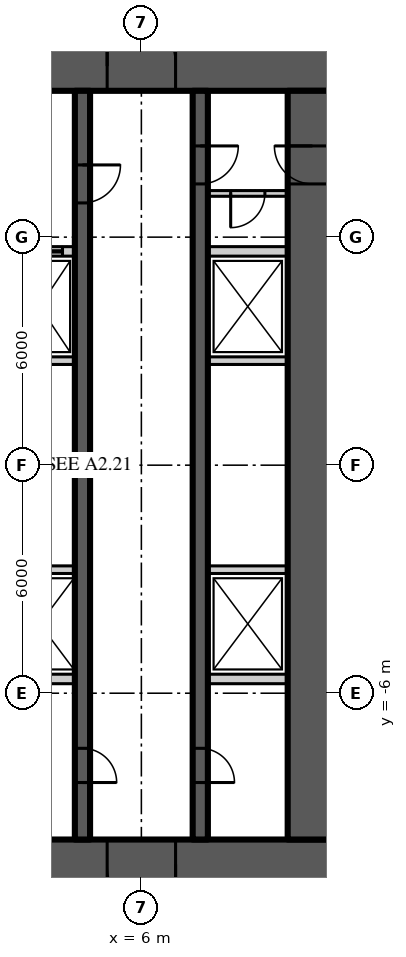
"""IFC4 building model, lengths in metres.
Left out: names, types, materials, properties, quantities, classifications, styles, units other than length and angle.
Written with IfcOpenShell. Run it as: python <this file> out.ifc"""

import sys

from ifc_helpers import new_model, si_unit, direction, frame, frame_2d, origin, place, context, subcontext, project, spatial, rectangle, extrude, element, fill, save


model = new_model("IFC4")
c1 = context("Model", 3, precision=1e-05, world=origin(), true_north=direction((0.0, 1.0)))
c2 = subcontext(c1, "Body", "Model", "MODEL_VIEW")
j1 = project(units=[si_unit("LENGTHUNIT", "METRE"), si_unit("PLANEANGLEUNIT", "RADIAN")], contexts=[c1])
p1 = place(None, origin())
s1 = spatial("IfcSite", under=j1, at=p1, CompositionType="ELEMENT")
p2 = place(p1, origin())
s2 = spatial("IfcBuilding", under=s1, at=p2, CompositionType="ELEMENT")
p3 = place(p2, frame((0.0, 0.0, 151.5)))
s3 = spatial("IfcBuildingStorey", under=s2, at=p3, CompositionType="ELEMENT", Elevation=151.5)
p4 = place(p3, frame((-11.15, 10.5, 0.0), z_axis=(0.0, 0.0, 1.0), x_axis=(1.0, 0.0, 0.0)))
e1 = element("IfcWall", 1, at=p4, inside=s3, PredefinedType="SHEAR", context=c2, shape_type="SweptSolid", body=[
    extrude(rectangle(XDim=22.3, YDim=1.3, at=frame_2d((11.15, 0.0))), origin(), (0.0, 0.0, 1.0), 3.9),
])
p5 = place(p4, frame((4.25, 0.0, 0.0)))
e2 = element("IfcOpeningElement", 2, at=p5, cuts=e1, PredefinedType="OPENING", context=c2, shape_type="SweptSolid", body=[
    extrude(rectangle(XDim=1.8, YDim=2.2, at=frame_2d((0.9, 1.1))), frame((0.0, 0.66, 0.0), z_axis=(0.0, -1.0, 0.0), x_axis=(1.0, 0.0, 0.0)), (0.0, 0.0, 1.0), 1.32),
])
p6 = place(p4, frame((16.25, 0.0, 0.0)))
e3 = element("IfcOpeningElement", 3, at=p6, cuts=e1, PredefinedType="OPENING", context=c2, shape_type="SweptSolid", body=[
    extrude(rectangle(XDim=1.8, YDim=2.2, at=frame_2d((0.9, 1.1))), frame((0.0, 0.66, 0.0), z_axis=(0.0, -1.0, 0.0), x_axis=(1.0, 0.0, 0.0)), (0.0, 0.0, 1.0), 1.32),
])
p7 = place(p3, frame((11.15, -10.5, 0.0), z_axis=(0.0, 0.0, 1.0), x_axis=(-1.0, 0.0, 0.0)))
e4 = element("IfcWall", 4, at=p7, inside=s3, PredefinedType="SHEAR", context=c2, shape_type="SweptSolid", body=[
    extrude(rectangle(XDim=22.3, YDim=1.3, at=frame_2d((11.15, 0.0))), origin(), (0.0, 0.0, 1.0), 3.9),
])
p8 = place(p7, frame((16.25, 0.0, 0.0)))
e5 = element("IfcOpeningElement", 5, at=p8, cuts=e4, PredefinedType="OPENING", context=c2, shape_type="SweptSolid", body=[
    extrude(rectangle(XDim=1.8, YDim=2.2, at=frame_2d((0.9, 1.1))), frame((0.0, 0.66, 0.0), z_axis=(0.0, -1.0, 0.0), x_axis=(1.0, 0.0, 0.0)), (0.0, 0.0, 1.0), 1.32),
])
p9 = place(p7, frame((4.25, 0.0, 0.0)))
e6 = element("IfcOpeningElement", 6, at=p9, cuts=e4, PredefinedType="OPENING", context=c2, shape_type="SweptSolid", body=[
    extrude(rectangle(XDim=1.8, YDim=2.2, at=frame_2d((0.9, 1.1))), frame((0.0, 0.66, 0.0), z_axis=(0.0, -1.0, 0.0), x_axis=(1.0, 0.0, 0.0)), (0.0, 0.0, 1.0), 1.32),
])
p10 = place(p3, frame((10.5, -9.85, 0.0), z_axis=(0.0, 0.0, 1.0), x_axis=(0.0, 1.0, 0.0)))
e7 = element("IfcWall", 7, at=p10, inside=s3, PredefinedType="SHEAR", context=c2, shape_type="SweptSolid", body=[
    extrude(rectangle(XDim=19.7, YDim=1.3, at=frame_2d((9.85, 0.0))), origin(), (0.0, 0.0, 1.0), 3.9),
])
p11 = place(p10, frame((17.25, 0.0, 0.0)))
e8 = element("IfcOpeningElement", 8, at=p11, cuts=e7, PredefinedType="OPENING", context=c2, shape_type="SweptSolid", body=[
    extrude(rectangle(XDim=1.0, YDim=2.2, at=frame_2d((0.5, 1.1))), frame((0.0, 0.66, 0.0), z_axis=(0.0, -1.0, 0.0), x_axis=(1.0, 0.0, 0.0)), (0.0, 0.0, 1.0), 1.32),
])
p12 = place(p3, frame((7.55, 9.85, 0.0), z_axis=(0.0, 0.0, 1.0), x_axis=(0.0, -1.0, 0.0)))
e9 = element("IfcWall", 9, at=p12, inside=s3, PredefinedType="SHEAR", context=c2, shape_type="SweptSolid", body=[
    extrude(rectangle(XDim=19.7, YDim=0.4, at=frame_2d((9.85, 0.0))), origin(), (0.0, 0.0, 1.0), 3.9),
])
p13 = place(p12, frame((1.45, 0.0, 0.0)))
e10 = element("IfcOpeningElement", 10, at=p13, cuts=e9, PredefinedType="OPENING", context=c2, shape_type="SweptSolid", body=[
    extrude(rectangle(XDim=1.0, YDim=2.2, at=frame_2d((0.5, 1.1))), frame((0.0, 0.21, 0.0), z_axis=(0.0, -1.0, 0.0), x_axis=(1.0, 0.0, 0.0)), (0.0, 0.0, 1.0), 0.42),
])
p14 = place(p12, frame((17.3, 0.0, 0.0)))
e11 = element("IfcOpeningElement", 11, at=p14, cuts=e9, PredefinedType="OPENING", context=c2, shape_type="SweptSolid", body=[
    extrude(rectangle(XDim=0.9, YDim=2.1, at=frame_2d((0.45, 1.05))), frame((0.0, 0.21, 0.0), z_axis=(0.0, -1.0, 0.0), x_axis=(1.0, 0.0, 0.0)), (0.0, 0.0, 1.0), 0.42),
])
p15 = place(p3, frame((4.45, 9.85, 0.0), z_axis=(0.0, 0.0, 1.0), x_axis=(0.0, -1.0, 0.0)))
e12 = element("IfcWall", 12, at=p15, inside=s3, PredefinedType="SHEAR", context=c2, shape_type="SweptSolid", body=[
    extrude(rectangle(XDim=19.7, YDim=0.4, at=frame_2d((9.85, 0.0))), origin(), (0.0, 0.0, 1.0), 3.9),
])
p16 = place(p15, frame((1.95, 0.0, 0.0)))
e13 = element("IfcOpeningElement", 13, at=p16, cuts=e12, PredefinedType="OPENING", context=c2, shape_type="SweptSolid", body=[
    extrude(rectangle(XDim=1.0, YDim=2.2, at=frame_2d((0.5, 1.1))), frame((0.0, 0.21, 0.0), z_axis=(0.0, -1.0, 0.0), x_axis=(1.0, 0.0, 0.0)), (0.0, 0.0, 1.0), 0.42),
])
p17 = place(p15, frame((17.3, 0.0, 0.0)))
e14 = element("IfcOpeningElement", 14, at=p17, cuts=e12, PredefinedType="OPENING", context=c2, shape_type="SweptSolid", body=[
    extrude(rectangle(XDim=0.9, YDim=2.1, at=frame_2d((0.45, 1.05))), frame((0.0, 0.21, 0.0), z_axis=(0.0, -1.0, 0.0), x_axis=(1.0, 0.0, 0.0)), (0.0, 0.0, 1.0), 0.42),
])
p18 = place(p3, frame((2.4, 5.625, 0.0), z_axis=(0.0, 0.0, 1.0), x_axis=(1.0, 0.0, 0.0)))
e15 = element("IfcWall", 15, at=p18, inside=s3, PredefinedType="SOLIDWALL", context=c2, shape_type="SweptSolid", body=[
    extrude(rectangle(XDim=1.85, YDim=0.25, at=frame_2d((0.925, 0.0))), origin(), (0.0, 0.0, 1.0), 3.7),
])
p19 = place(p18, frame((0.325, 0.0, 0.0)))
e16 = element("IfcOpeningElement", 16, at=p19, cuts=e15, PredefinedType="OPENING", context=c2, shape_type="SweptSolid", body=[
    extrude(rectangle(XDim=1.2, YDim=2.2, at=frame_2d((0.6, 1.1))), frame((0.0, 0.135, 0.0), z_axis=(0.0, -1.0, 0.0), x_axis=(1.0, 0.0, 0.0)), (0.0, 0.0, 1.0), 0.27),
])
p20 = place(p3, frame((7.75, 5.625, 0.0), z_axis=(0.0, 0.0, 1.0), x_axis=(1.0, 0.0, 0.0)))
e17 = element("IfcWall", 17, at=p20, inside=s3, PredefinedType="SOLIDWALL", context=c2, shape_type="SweptSolid", body=[
    extrude(rectangle(XDim=2.1, YDim=0.25, at=frame_2d((1.05, 0.0))), origin(), (0.0, 0.0, 1.0), 3.7),
])
p21 = place(p3, frame((2.4, -5.625, 0.0), z_axis=(0.0, 0.0, 1.0), x_axis=(1.0, 0.0, 0.0)))
e18 = element("IfcWall", 18, at=p21, inside=s3, PredefinedType="SOLIDWALL", context=c2, shape_type="SweptSolid", body=[
    extrude(rectangle(XDim=1.85, YDim=0.25, at=frame_2d((0.925, 0.0))), origin(), (0.0, 0.0, 1.0), 3.7),
])
p22 = place(p3, frame((7.75, -5.625, 0.0), z_axis=(0.0, 0.0, 1.0), x_axis=(1.0, 0.0, 0.0)))
e19 = element("IfcWall", 19, at=p22, inside=s3, PredefinedType="SOLIDWALL", context=c2, shape_type="SweptSolid", body=[
    extrude(rectangle(XDim=2.1, YDim=0.25, at=frame_2d((1.05, 0.0))), origin(), (0.0, 0.0, 1.0), 3.7),
])
p23 = place(p3, frame((2.4, -2.75, 0.0), z_axis=(0.0, 0.0, 1.0), x_axis=(1.0, 0.0, 0.0)))
e20 = element("IfcWall", 20, at=p23, inside=s3, PredefinedType="SOLIDWALL", context=c2, shape_type="SweptSolid", body=[
    extrude(rectangle(XDim=1.85, YDim=0.2, at=frame_2d((0.925, 0.0))), origin(), (0.0, 0.0, 1.0), 3.7),
])
p24 = place(p3, frame((7.75, -2.75, 0.0), z_axis=(0.0, 0.0, 1.0), x_axis=(1.0, 0.0, 0.0)))
e21 = element("IfcWall", 21, at=p24, inside=s3, PredefinedType="SOLIDWALL", context=c2, shape_type="SweptSolid", body=[
    extrude(rectangle(XDim=2.1, YDim=0.2, at=frame_2d((1.05, 0.0))), origin(), (0.0, 0.0, 1.0), 3.7),
])
p25 = place(p3, frame((2.4, 2.75, 0.0), z_axis=(0.0, 0.0, 1.0), x_axis=(1.0, 0.0, 0.0)))
e22 = element("IfcWall", 22, at=p25, inside=s3, PredefinedType="SOLIDWALL", context=c2, shape_type="SweptSolid", body=[
    extrude(rectangle(XDim=1.85, YDim=0.2, at=frame_2d((0.925, 0.0))), origin(), (0.0, 0.0, 1.0), 3.7),
])
p26 = place(p3, frame((7.75, 2.75, 0.0), z_axis=(0.0, 0.0, 1.0), x_axis=(1.0, 0.0, 0.0)))
e23 = element("IfcWall", 23, at=p26, inside=s3, PredefinedType="SOLIDWALL", context=c2, shape_type="SweptSolid", body=[
    extrude(rectangle(XDim=2.1, YDim=0.2, at=frame_2d((1.05, 0.0))), origin(), (0.0, 0.0, 1.0), 3.7),
])
p27 = place(p3, frame((9.85, 7.15, 0.0), z_axis=(0.0, 0.0, 1.0), x_axis=(-1.0, 0.0, 0.0)))
e24 = element("IfcWall", 24, at=p27, inside=s3, PredefinedType="SOLIDWALL", context=c2, shape_type="SweptSolid", body=[
    extrude(rectangle(XDim=2.1, YDim=0.15, at=frame_2d((1.05, 0.0))), origin(), (0.0, 0.0, 1.0), 3.77),
])
p28 = place(p27, frame((0.6, 0.0, 0.0)))
e25 = element("IfcOpeningElement", 25, at=p28, cuts=e24, PredefinedType="OPENING", context=c2, shape_type="SweptSolid", body=[
    extrude(rectangle(XDim=0.9, YDim=2.1, at=frame_2d((0.45, 1.05))), frame((0.0, 0.085, 0.0), z_axis=(0.0, -1.0, 0.0), x_axis=(1.0, 0.0, 0.0)), (0.0, 0.0, 1.0), 0.17),
])
p29 = place(p6, origin())
e26 = element("IfcDoor", 26, at=p29, inside=s3, OperationType="DOUBLE_DOOR_DOUBLE_SWING", PredefinedType="DOOR", context=c2, shape_type="SweptSolid", body=[
    extrude(rectangle(XDim=1.8, YDim=2.2, at=frame_2d((0.9, 1.1))), frame((0.0, 0.025, 0.0), z_axis=(0.0, -1.0, 0.0), x_axis=(1.0, 0.0, 0.0)), (0.0, 0.0, 1.0), 0.05),
])
fill(e3, e26)
p30 = place(p9, origin())
e27 = element("IfcDoor", 27, at=p30, inside=s3, OperationType="DOUBLE_DOOR_DOUBLE_SWING", PredefinedType="DOOR", context=c2, shape_type="SweptSolid", body=[
    extrude(rectangle(XDim=1.8, YDim=2.2, at=frame_2d((0.9, 1.1))), frame((0.0, 0.025, 0.0), z_axis=(0.0, -1.0, 0.0), x_axis=(1.0, 0.0, 0.0)), (0.0, 0.0, 1.0), 0.05),
])
fill(e6, e27)
p31 = place(p13, origin())
e28 = element("IfcDoor", 28, at=p31, inside=s3, OperationType="SINGLE_SWING_LEFT", PredefinedType="DOOR", context=c2, shape_type="SweptSolid", body=[
    extrude(rectangle(XDim=1.0, YDim=2.2, at=frame_2d((0.5, 1.1))), frame((0.0, 0.025, 0.0), z_axis=(0.0, -1.0, 0.0), x_axis=(1.0, 0.0, 0.0)), (0.0, 0.0, 1.0), 0.05),
])
fill(e10, e28)
p32 = place(p11, origin())
e29 = element("IfcDoor", 29, at=p32, inside=s3, OperationType="SINGLE_SWING_RIGHT", PredefinedType="DOOR", context=c2, shape_type="SweptSolid", body=[
    extrude(rectangle(XDim=1.0, YDim=2.2, at=frame_2d((0.5, 1.1))), frame((0.0, 0.025, 0.0), z_axis=(0.0, -1.0, 0.0), x_axis=(1.0, 0.0, 0.0)), (0.0, 0.0, 1.0), 0.05),
])
fill(e8, e29)
p33 = place(p16, origin())
e30 = element("IfcDoor", 30, at=p33, inside=s3, OperationType="SINGLE_SWING_LEFT", PredefinedType="DOOR", context=c2, shape_type="SweptSolid", body=[
    extrude(rectangle(XDim=1.0, YDim=2.2, at=frame_2d((0.5, 1.1))), frame((0.0, 0.025, 0.0), z_axis=(0.0, -1.0, 0.0), x_axis=(1.0, 0.0, 0.0)), (0.0, 0.0, 1.0), 0.05),
])
fill(e13, e30)
p34 = place(p14, origin())
e31 = element("IfcDoor", 31, at=p34, inside=s3, OperationType="SINGLE_SWING_RIGHT", PredefinedType="DOOR", context=c2, shape_type="SweptSolid", body=[
    extrude(rectangle(XDim=0.9, YDim=2.1, at=frame_2d((0.45, 1.05))), frame((0.0, 0.025, 0.0), z_axis=(0.0, -1.0, 0.0), x_axis=(1.0, 0.0, 0.0)), (0.0, 0.0, 1.0), 0.05),
])
fill(e11, e31)
p35 = place(p17, origin())
e32 = element("IfcDoor", 32, at=p35, inside=s3, OperationType="SINGLE_SWING_RIGHT", PredefinedType="DOOR", context=c2, shape_type="SweptSolid", body=[
    extrude(rectangle(XDim=0.9, YDim=2.1, at=frame_2d((0.45, 1.05))), frame((0.0, 0.025, 0.0), z_axis=(0.0, -1.0, 0.0), x_axis=(1.0, 0.0, 0.0)), (0.0, 0.0, 1.0), 0.05),
])
fill(e14, e32)
p36 = place(p19, origin())
e33 = element("IfcDoor", 33, at=p36, inside=s3, OperationType="SLIDING_TO_LEFT", PredefinedType="DOOR", context=c2, shape_type="SweptSolid", body=[
    extrude(rectangle(XDim=1.2, YDim=2.2, at=frame_2d((0.6, 1.1))), frame((0.0, 0.025, 0.0), z_axis=(0.0, -1.0, 0.0), x_axis=(1.0, 0.0, 0.0)), (0.0, 0.0, 1.0), 0.05),
])
fill(e16, e33)
p37 = place(p28, origin())
e34 = element("IfcDoor", 34, at=p37, inside=s3, OperationType="SINGLE_SWING_RIGHT", PredefinedType="DOOR", context=c2, shape_type="SweptSolid", body=[
    extrude(rectangle(XDim=0.9, YDim=2.1, at=frame_2d((0.45, 1.05))), frame((0.0, 0.025, 0.0), z_axis=(0.0, -1.0, 0.0), x_axis=(1.0, 0.0, 0.0)), (0.0, 0.0, 1.0), 0.05),
])
fill(e25, e34)
save(model, sys.argv[1])
